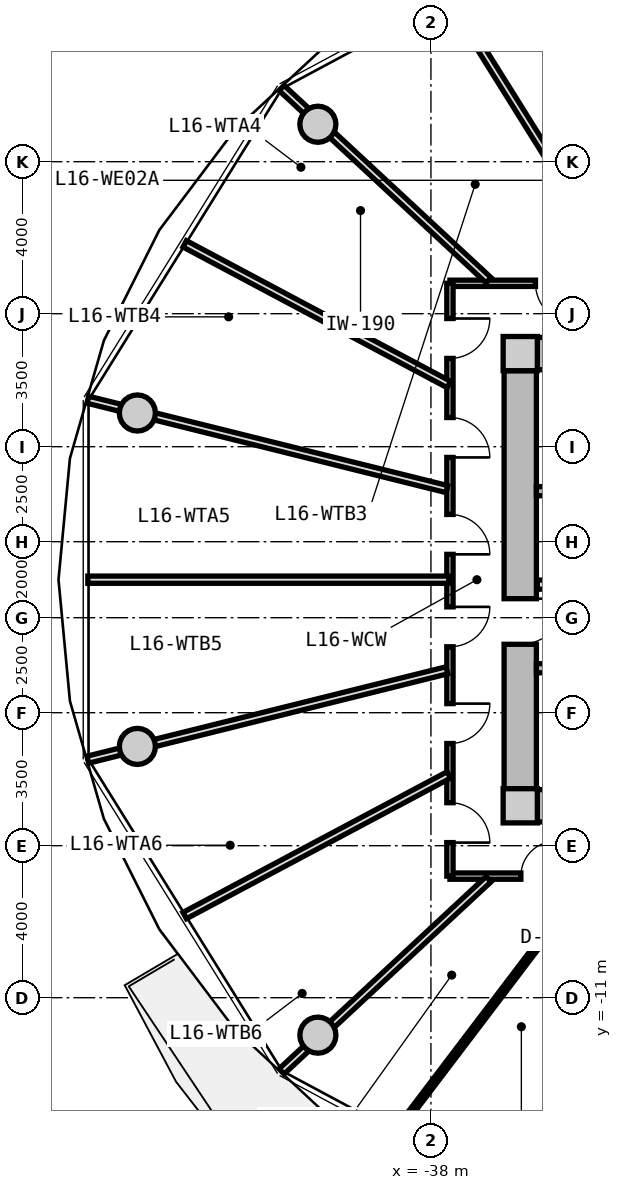
"""IFC4 building model, lengths in metres.
Left out: names, types, materials, properties, quantities, classifications, styles, units other than length and angle.
Written with IfcOpenShell. Run it as: python <this file> out.ifc"""

import sys

from ifc_helpers import new_model, si_unit, direction, frame, frame_2d, origin, origin_2d, place, context, subcontext, project, spatial, rectangle, circle, extrude, source, transform, mapped, element, fill, save


model = new_model("IFC4")
c1 = context("Model", 3, precision=1e-05, world=origin(), true_north=direction((0.0, 1.0)))
c2 = subcontext(c1, "Body", "Model", "MODEL_VIEW")
j1 = project(units=[si_unit("LENGTHUNIT", "METRE"), si_unit("PLANEANGLEUNIT", "RADIAN")], contexts=[c1])
p1 = place(None, origin())
s1 = spatial("IfcSite", under=j1, at=p1, CompositionType="ELEMENT")
p2 = place(p1, origin())
s2 = spatial("IfcBuilding", under=s1, at=p2, CompositionType="ELEMENT")
p3 = place(p2, frame((0.0, 0.0, 55.15)))
s3 = spatial("IfcBuildingStorey", under=s2, at=p3, CompositionType="ELEMENT", Elevation=55.15)
m1 = source(origin(), c2, "Body", "SweptSolid", [
    extrude(rectangle(XDim=0.9, YDim=0.9, at=origin_2d()), origin(), (0.0, 0.0, 1.0), 3.05),
])
for number, where, z_axis, x_axis in (
    (1, (-35.65, -5.95, 0.0), (0.0, 0.0, 1.0), (1.0, 0.0, 0.0)),
    (2, (-35.65, 5.95, 0.0), (0.0, 0.0, 1.0), (1.0, 0.0, 0.0)),
):
    element("IfcColumn", number, at=place(p3, frame(where, z_axis=z_axis, x_axis=x_axis)), inside=s3, PredefinedType="COLUMN", context=c2, shape_type="MappedRepresentation", body=[
        mapped(m1, transform((0.0, 0.0, 0.0), x_axis=(1.0, 0.0, 0.0), y_axis=(0.0, 1.0, 0.0), z_axis=(0.0, 0.0, 1.0), scale=1.0)),
    ])
m2 = source(origin(), c2, "Body", "SweptSolid", [
    extrude(rectangle(XDim=14.4, YDim=0.85, at=frame_2d((7.2, 0.0))), origin(), (0.0, 0.0, 1.0), 2.79),
])
for number, where, z_axis, x_axis in (
    (3, (-35.2, 5.95, 0.0), (0.0, 0.0, 1.0), (1.0, 0.0, 0.0)),
    (4, (-20.8, -5.95, 0.0), (0.0, 0.0, 1.0), (-1.0, 0.0, 0.0)),
):
    element("IfcWall", number, at=place(p3, frame(where, z_axis=z_axis, x_axis=x_axis)), inside=s3, PredefinedType="SHEAR", context=c2, shape_type="MappedRepresentation", body=[
        mapped(m2, transform((0.0, 0.0, 0.0), x_axis=(1.0, 0.0, 0.0), y_axis=(0.0, 1.0, 0.0), z_axis=(0.0, 0.0, 1.0), scale=1.0)),
    ])
m3 = source(origin(), c2, "Body", "SweptSolid", [
    extrude(rectangle(XDim=11.0, YDim=0.85, at=frame_2d((5.5, 0.0))), origin(), (0.0, 0.0, 1.0), 2.79),
])
p4 = place(p3, frame((-35.65, -5.5, 0.0), z_axis=(0.0, 0.0, 1.0), x_axis=(0.0, 1.0, 0.0)))
e5 = element("IfcWall", 5, at=p4, inside=s3, PredefinedType="SHEAR", context=c2, shape_type="MappedRepresentation", body=[
    mapped(m3, transform((0.0, 0.0, 0.0), x_axis=(1.0, 0.0, 0.0), y_axis=(0.0, 1.0, 0.0), z_axis=(0.0, 0.0, 1.0), scale=1.0)),
])
p5 = place(p4, frame((3.8, 0.0, 0.0)))
e6 = element("IfcOpeningElement", 6, at=p5, cuts=e5, PredefinedType="OPENING", context=c2, shape_type="SweptSolid", body=[
    extrude(rectangle(XDim=1.2, YDim=2.15, at=frame_2d((0.6, 1.075))), frame((0.0, 0.435, 0.0), z_axis=(0.0, -1.0, 0.0), x_axis=(1.0, 0.0, 0.0)), (0.0, 0.0, 1.0), 0.87),
])
m4 = source(origin(), c2, "Body", "SweptSolid", [
    extrude(circle(Radius=0.475, at=origin_2d()), origin(), (0.0, 0.0, 1.0), 3.05),
])
for number, where, z_axis, x_axis in (
    (7, (-40.975, 11.985, 0.0), (0.0, 0.0, 1.0), (1.0, 0.0, 0.0)),
    (8, (-45.725, 4.387, 0.0), (0.0, 0.0, 1.0), (1.0, 0.0, 0.0)),
    (9, (-45.725, -4.387, 0.0), (0.0, 0.0, 1.0), (1.0, 0.0, 0.0)),
    (10, (-40.975, -11.985, 0.0), (0.0, 0.0, 1.0), (1.0, 0.0, 0.0)),
):
    element("IfcColumn", number, at=place(p3, frame(where, z_axis=z_axis, x_axis=x_axis)), inside=s3, PredefinedType="COLUMN", context=c2, shape_type="MappedRepresentation", body=[
        mapped(m4, transform((0.0, 0.0, 0.0), x_axis=(1.0, 0.0, 0.0), y_axis=(0.0, 1.0, 0.0), z_axis=(0.0, 0.0, 1.0), scale=1.0)),
    ])
m5 = source(origin(), c2, "Body", "SweptSolid", [
    extrude(rectangle(XDim=7.765, YDim=0.24, at=frame_2d((3.883, 0.0))), origin(), (0.0, 0.0, 1.0), 2.79),
])
p6 = place(p3, frame((-35.225, 2.33, 0.0), z_axis=(0.0, 0.0, 1.0), x_axis=(1.0, 0.0, 0.0)))
e11 = element("IfcWall", 11, at=p6, inside=s3, PredefinedType="PARTITIONING", context=c2, shape_type="MappedRepresentation", body=[
    mapped(m5, transform((0.0, 0.0, 0.0), x_axis=(1.0, 0.0, 0.0), y_axis=(0.0, 1.0, 0.0), z_axis=(0.0, 0.0, 1.0), scale=1.0)),
])
p7 = place(p3, frame((-35.225, -2.33, 0.0), z_axis=(0.0, 0.0, 1.0), x_axis=(1.0, 0.0, 0.0)))
e12 = element("IfcWall", 12, at=p7, inside=s3, PredefinedType="PARTITIONING", context=c2, shape_type="MappedRepresentation", body=[
    mapped(m5, transform((0.0, 0.0, 0.0), x_axis=(1.0, 0.0, 0.0), y_axis=(0.0, 1.0, 0.0), z_axis=(0.0, 0.0, 1.0), scale=1.0)),
])
p8 = place(p7, frame((0.885, 0.0, 0.0)))
e13 = element("IfcOpeningElement", 13, at=p8, cuts=e12, PredefinedType="OPENING", context=c2, shape_type="SweptSolid", body=[
    extrude(rectangle(XDim=1.1, YDim=2.15, at=frame_2d((0.55, 1.075))), frame((0.0, 0.13, 0.0), z_axis=(0.0, -1.0, 0.0), x_axis=(1.0, 0.0, 0.0)), (0.0, 0.0, 1.0), 0.26),
])
m6 = source(origin(), c2, "Body", "SweptSolid", [
    extrude(rectangle(XDim=7.62, YDim=0.24, at=frame_2d((3.81, 0.0))), origin(), (0.0, 0.0, 1.0), 2.775),
])
p9 = place(p3, frame((-35.2, -0.13, 0.0), z_axis=(0.0, 0.0, 1.0), x_axis=(1.0, 0.0, 0.0)))
e14 = element("IfcWall", 14, at=p9, inside=s3, PredefinedType="PARTITIONING", context=c2, shape_type="MappedRepresentation", body=[
    mapped(m6, transform((0.0, 0.0, 0.0), x_axis=(1.0, 0.0, 0.0), y_axis=(0.0, 1.0, 0.0), z_axis=(0.0, 0.0, 1.0), scale=1.0)),
])
p10 = place(p9, frame((6.22, 0.0, 0.0)))
e15 = element("IfcOpeningElement", 15, at=p10, cuts=e14, PredefinedType="OPENING", context=c2, shape_type="SweptSolid", body=[
    extrude(rectangle(XDim=1.0, YDim=2.1, at=frame_2d((0.5, 1.05))), frame((0.0, 0.13, 0.0), z_axis=(0.0, -1.0, 0.0), x_axis=(1.0, 0.0, 0.0)), (0.0, 0.0, 1.0), 0.26),
])
p11 = place(p9, frame((0.85, 0.0, 0.0)))
e16 = element("IfcOpeningElement", 16, at=p11, cuts=e14, PredefinedType="OPENING", context=c2, shape_type="SweptSolid", body=[
    extrude(rectangle(XDim=1.1, YDim=2.2, at=frame_2d((0.55, 1.1))), frame((0.0, 0.13, 0.0), z_axis=(0.0, -1.0, 0.0), x_axis=(1.0, 0.0, 0.0)), (0.0, 0.0, 1.0), 0.26),
])
p12 = place(p9, frame((3.85, 0.0, 0.0)))
e17 = element("IfcOpeningElement", 17, at=p12, cuts=e14, PredefinedType="OPENING", context=c2, shape_type="SweptSolid", body=[
    extrude(rectangle(XDim=1.1, YDim=2.2, at=frame_2d((0.55, 1.1))), frame((0.0, 0.13, 0.0), z_axis=(0.0, -1.0, 0.0), x_axis=(1.0, 0.0, 0.0)), (0.0, 0.0, 1.0), 0.26),
])
m7 = source(origin(), c2, "Body", "SweptSolid", [
    extrude(rectangle(XDim=19.0, YDim=0.165, at=frame_2d((9.5, 0.0))), origin(), (0.0, 0.0, 1.0), 2.775),
])
p13 = place(p3, frame((-37.5, 7.8, 0.0), z_axis=(0.0, 0.0, 1.0), x_axis=(1.0, 0.0, 0.0)))
e18 = element("IfcWall", 18, at=p13, inside=s3, PredefinedType="PARTITIONING", context=c2, shape_type="MappedRepresentation", body=[
    mapped(m7, transform((0.0, 0.0, 0.0), x_axis=(1.0, 0.0, 0.0), y_axis=(0.0, 1.0, 0.0), z_axis=(0.0, 0.0, 1.0), scale=1.0)),
])
p14 = place(p13, frame((14.653, 0.0, 0.0)))
e19 = element("IfcOpeningElement", 19, at=p14, cuts=e18, PredefinedType="OPENING", context=c2, shape_type="SweptSolid", body=[
    extrude(rectangle(XDim=1.05, YDim=2.15, at=frame_2d((0.525, 1.075))), frame((0.0, 0.093, 0.0), z_axis=(0.0, -1.0, 0.0), x_axis=(1.0, 0.0, 0.0)), (0.0, 0.0, 1.0), 0.185),
])
p15 = place(p13, frame((12.5, 0.0, 0.0)))
e20 = element("IfcOpeningElement", 20, at=p15, cuts=e18, PredefinedType="OPENING", context=c2, shape_type="SweptSolid", body=[
    extrude(rectangle(XDim=1.05, YDim=2.15, at=frame_2d((0.525, 1.075))), frame((0.0, 0.093, 0.0), z_axis=(0.0, -1.0, 0.0), x_axis=(1.0, 0.0, 0.0)), (0.0, 0.0, 1.0), 0.185),
])
p16 = place(p13, frame((9.352, 0.0, 0.0)))
e21 = element("IfcOpeningElement", 21, at=p16, cuts=e18, PredefinedType="OPENING", context=c2, shape_type="SweptSolid", body=[
    extrude(rectangle(XDim=1.05, YDim=2.15, at=frame_2d((0.525, 1.075))), frame((0.0, 0.093, 0.0), z_axis=(0.0, -1.0, 0.0), x_axis=(1.0, 0.0, 0.0)), (0.0, 0.0, 1.0), 0.185),
])
p17 = place(p13, frame((7.806, 0.0, 0.0)))
e22 = element("IfcOpeningElement", 22, at=p17, cuts=e18, PredefinedType="OPENING", context=c2, shape_type="SweptSolid", body=[
    extrude(rectangle(XDim=1.05, YDim=2.15, at=frame_2d((0.525, 1.075))), frame((0.0, 0.093, 0.0), z_axis=(0.0, -1.0, 0.0), x_axis=(1.0, 0.0, 0.0)), (0.0, 0.0, 1.0), 0.185),
])
p18 = place(p13, frame((5.396, 0.0, 0.0)))
e23 = element("IfcOpeningElement", 23, at=p18, cuts=e18, PredefinedType="OPENING", context=c2, shape_type="SweptSolid", body=[
    extrude(rectangle(XDim=1.05, YDim=2.15, at=frame_2d((0.525, 1.075))), frame((0.0, 0.093, 0.0), z_axis=(0.0, -1.0, 0.0), x_axis=(1.0, 0.0, 0.0)), (0.0, 0.0, 1.0), 0.185),
])
p19 = place(p13, frame((2.251, 0.0, 0.0)))
e24 = element("IfcOpeningElement", 24, at=p19, cuts=e18, PredefinedType="OPENING", context=c2, shape_type="SweptSolid", body=[
    extrude(rectangle(XDim=1.05, YDim=2.15, at=frame_2d((0.525, 1.075))), frame((0.0, 0.093, 0.0), z_axis=(0.0, -1.0, 0.0), x_axis=(1.0, 0.0, 0.0)), (0.0, 0.0, 1.0), 0.185),
])
p20 = place(p3, frame((-18.5, -7.8, 0.0), z_axis=(0.0, 0.0, 1.0), x_axis=(-1.0, 0.0, 0.0)))
e25 = element("IfcWall", 25, at=p20, inside=s3, PredefinedType="PARTITIONING", context=c2, shape_type="MappedRepresentation", body=[
    mapped(m7, transform((0.0, 0.0, 0.0), x_axis=(1.0, 0.0, 0.0), y_axis=(0.0, 1.0, 0.0), z_axis=(0.0, 0.0, 1.0), scale=1.0)),
])
p21 = place(p20, frame((16.214, 0.0, 0.0)))
e26 = element("IfcOpeningElement", 26, at=p21, cuts=e25, PredefinedType="OPENING", context=c2, shape_type="SweptSolid", body=[
    extrude(rectangle(XDim=0.92, YDim=2.1, at=frame_2d((0.46, 1.05))), frame((0.0, 0.093, 0.0), z_axis=(0.0, -1.0, 0.0), x_axis=(1.0, 0.0, 0.0)), (0.0, 0.0, 1.0), 0.185),
])
p22 = place(p20, frame((13.063, 0.0, 0.0)))
e27 = element("IfcOpeningElement", 27, at=p22, cuts=e25, PredefinedType="OPENING", context=c2, shape_type="SweptSolid", body=[
    extrude(rectangle(XDim=0.92, YDim=2.1, at=frame_2d((0.46, 1.05))), frame((0.0, 0.093, 0.0), z_axis=(0.0, -1.0, 0.0), x_axis=(1.0, 0.0, 0.0)), (0.0, 0.0, 1.0), 0.185),
])
p23 = place(p20, frame((8.875, 0.0, 0.0)))
e28 = element("IfcOpeningElement", 28, at=p23, cuts=e25, PredefinedType="OPENING", context=c2, shape_type="SweptSolid", body=[
    extrude(rectangle(XDim=1.25, YDim=2.2, at=frame_2d((0.625, 1.1))), frame((0.0, 0.093, 0.0), z_axis=(0.0, -1.0, 0.0), x_axis=(1.0, 0.0, 0.0)), (0.0, 0.0, 1.0), 0.185),
])
p24 = place(p20, frame((3.506, 0.0, 0.0)))
e29 = element("IfcOpeningElement", 29, at=p24, cuts=e25, PredefinedType="OPENING", context=c2, shape_type="SweptSolid", body=[
    extrude(rectangle(XDim=1.25, YDim=2.2, at=frame_2d((0.625, 1.1))), frame((0.0, 0.093, 0.0), z_axis=(0.0, -1.0, 0.0), x_axis=(1.0, 0.0, 0.0)), (0.0, 0.0, 1.0), 0.185),
])
m8 = source(origin(), c2, "Body", "SweptSolid", [
    extrude(rectangle(XDim=15.6, YDim=0.165, at=frame_2d((7.8, 0.0))), origin(), (0.0, 0.0, 1.0), 2.775),
])
p25 = place(p3, frame((-37.5, -7.8, 0.0), z_axis=(0.0, 0.0, 1.0), x_axis=(0.0, 1.0, 0.0)))
e30 = element("IfcWall", 30, at=p25, inside=s3, PredefinedType="PARTITIONING", context=c2, shape_type="MappedRepresentation", body=[
    mapped(m8, transform((0.0, 0.0, 0.0), x_axis=(1.0, 0.0, 0.0), y_axis=(0.0, 1.0, 0.0), z_axis=(0.0, 0.0, 1.0), scale=1.0)),
])
p26 = place(p25, frame((13.623, 0.0, 0.0)))
e31 = element("IfcOpeningElement", 31, at=p26, cuts=e30, PredefinedType="OPENING", context=c2, shape_type="SweptSolid", body=[
    extrude(rectangle(XDim=1.05, YDim=2.15, at=frame_2d((0.525, 1.075))), frame((0.0, 0.093, 0.0), z_axis=(0.0, -1.0, 0.0), x_axis=(1.0, 0.0, 0.0)), (0.0, 0.0, 1.0), 0.185),
])
p27 = place(p25, frame((11.018, 0.0, 0.0)))
e32 = element("IfcOpeningElement", 32, at=p27, cuts=e30, PredefinedType="OPENING", context=c2, shape_type="SweptSolid", body=[
    extrude(rectangle(XDim=1.05, YDim=2.15, at=frame_2d((0.525, 1.075))), frame((0.0, 0.093, 0.0), z_axis=(0.0, -1.0, 0.0), x_axis=(1.0, 0.0, 0.0)), (0.0, 0.0, 1.0), 0.185),
])
p28 = place(p25, frame((8.467, 0.0, 0.0)))
e33 = element("IfcOpeningElement", 33, at=p28, cuts=e30, PredefinedType="OPENING", context=c2, shape_type="SweptSolid", body=[
    extrude(rectangle(XDim=1.05, YDim=2.15, at=frame_2d((0.525, 1.075))), frame((0.0, 0.093, 0.0), z_axis=(0.0, -1.0, 0.0), x_axis=(1.0, 0.0, 0.0)), (0.0, 0.0, 1.0), 0.185),
])
p29 = place(p25, frame((6.035, 0.0, 0.0)))
e34 = element("IfcOpeningElement", 34, at=p29, cuts=e30, PredefinedType="OPENING", context=c2, shape_type="SweptSolid", body=[
    extrude(rectangle(XDim=1.05, YDim=2.15, at=frame_2d((0.525, 1.075))), frame((0.0, 0.093, 0.0), z_axis=(0.0, -1.0, 0.0), x_axis=(1.0, 0.0, 0.0)), (0.0, 0.0, 1.0), 0.185),
])
p30 = place(p25, frame((3.489, 0.0, 0.0)))
e35 = element("IfcOpeningElement", 35, at=p30, cuts=e30, PredefinedType="OPENING", context=c2, shape_type="SweptSolid", body=[
    extrude(rectangle(XDim=1.05, YDim=2.15, at=frame_2d((0.525, 1.075))), frame((0.0, 0.093, 0.0), z_axis=(0.0, -1.0, 0.0), x_axis=(1.0, 0.0, 0.0)), (0.0, 0.0, 1.0), 0.185),
])
p31 = place(p25, frame((0.882, 0.0, 0.0)))
e36 = element("IfcOpeningElement", 36, at=p31, cuts=e30, PredefinedType="OPENING", context=c2, shape_type="SweptSolid", body=[
    extrude(rectangle(XDim=1.05, YDim=2.15, at=frame_2d((0.525, 1.075))), frame((0.0, 0.093, 0.0), z_axis=(0.0, -1.0, 0.0), x_axis=(1.0, 0.0, 0.0)), (0.0, 0.0, 1.0), 0.185),
])
m9 = source(origin(), c2, "Body", "SweptSolid", [
    extrude(rectangle(XDim=7.435, YDim=0.19, at=frame_2d((3.717, 0.0))), origin(), (0.0, 0.0, 1.0), 2.225),
])
p32 = place(p3, frame((-36.483, 7.88, 0.0), z_axis=(0.0, 0.0, 1.0), x_axis=(-0.732651956848, 0.680603489652, 0.0)))
e37 = element("IfcWall", 37, at=p32, inside=s3, PredefinedType="PARTITIONING", context=c2, shape_type="MappedRepresentation", body=[
    mapped(m9, transform((0.0, 0.0, 0.0), x_axis=(1.0, 0.0, 0.0), y_axis=(0.0, 1.0, 0.0), z_axis=(0.0, 0.0, 1.0), scale=1.0)),
])
m10 = source(origin(), c2, "Body", "SweptSolid", [
    extrude(rectangle(XDim=9.737, YDim=0.19, at=frame_2d((4.869, 0.0))), origin(), (0.0, 0.0, 1.0), 2.225),
])
p33 = place(p3, frame((-37.58, 2.385, 0.0), z_axis=(0.0, 0.0, 1.0), x_axis=(-0.970392716238, 0.241532557375, 0.0)))
e38 = element("IfcWall", 38, at=p33, inside=s3, PredefinedType="PARTITIONING", context=c2, shape_type="MappedRepresentation", body=[
    mapped(m10, transform((0.0, 0.0, 0.0), x_axis=(1.0, 0.0, 0.0), y_axis=(0.0, 1.0, 0.0), z_axis=(0.0, 0.0, 1.0), scale=1.0)),
])
m11 = source(origin(), c2, "Body", "SweptSolid", [
    extrude(rectangle(XDim=7.873, YDim=0.19, at=frame_2d((3.937, 0.0))), origin(), (0.0, 0.0, 1.0), 2.775),
])
p34 = place(p3, frame((-37.53, 5.138, 0.0), z_axis=(0.0, 0.0, 1.0), x_axis=(-0.882666052726, 0.470000680175, 0.0)))
e39 = element("IfcWall", 39, at=p34, inside=s3, PredefinedType="PARTITIONING", context=c2, shape_type="MappedRepresentation", body=[
    mapped(m11, transform((0.0, 0.0, 0.0), x_axis=(1.0, 0.0, 0.0), y_axis=(0.0, 1.0, 0.0), z_axis=(0.0, 0.0, 1.0), scale=1.0)),
])
p35 = place(p3, frame((-37.58, -2.385, 0.0), z_axis=(0.0, 0.0, 1.0), x_axis=(-0.970392716238, -0.241532557375, 0.0)))
e40 = element("IfcWall", 40, at=p35, inside=s3, PredefinedType="PARTITIONING", context=c2, shape_type="MappedRepresentation", body=[
    mapped(m10, transform((0.0, 0.0, 0.0), x_axis=(1.0, 0.0, 0.0), y_axis=(0.0, 1.0, 0.0), z_axis=(0.0, 0.0, 1.0), scale=1.0)),
])
m12 = source(origin(), c2, "Body", "SweptSolid", [
    extrude(rectangle(XDim=9.499, YDim=0.19, at=frame_2d((4.75, 0.0))), origin(), (0.0, 0.0, 1.0), 2.775),
])
p36 = place(p3, frame((-37.53, 0.0, 0.0), z_axis=(0.0, 0.0, 1.0), x_axis=(-1.0, 0.0, 0.0)))
e41 = element("IfcWall", 41, at=p36, inside=s3, PredefinedType="PARTITIONING", context=c2, shape_type="MappedRepresentation", body=[
    mapped(m12, transform((0.0, 0.0, 0.0), x_axis=(1.0, 0.0, 0.0), y_axis=(0.0, 1.0, 0.0), z_axis=(0.0, 0.0, 1.0), scale=1.0)),
])
p37 = place(p3, frame((-36.483, -7.88, 0.0), z_axis=(0.0, 0.0, 1.0), x_axis=(-0.732651956848, -0.680603489652, 0.0)))
e42 = element("IfcWall", 42, at=p37, inside=s3, PredefinedType="PARTITIONING", context=c2, shape_type="MappedRepresentation", body=[
    mapped(m9, transform((0.0, 0.0, 0.0), x_axis=(1.0, 0.0, 0.0), y_axis=(0.0, 1.0, 0.0), z_axis=(0.0, 0.0, 1.0), scale=1.0)),
])
p38 = place(p3, frame((-37.53, -5.138, 0.0), z_axis=(0.0, 0.0, 1.0), x_axis=(-0.882666052726, -0.470000680175, 0.0)))
e43 = element("IfcWall", 43, at=p38, inside=s3, PredefinedType="PARTITIONING", context=c2, shape_type="MappedRepresentation", body=[
    mapped(m11, transform((0.0, 0.0, 0.0), x_axis=(1.0, 0.0, 0.0), y_axis=(0.0, 1.0, 0.0), z_axis=(0.0, 0.0, 1.0), scale=1.0)),
])
m13 = source(origin(), c2, "Body", "SweptSolid", [
    extrude(rectangle(XDim=8.436, YDim=0.14, at=frame_2d((4.218, 0.0))), origin(), (0.0, 0.0, 1.0), 2.775),
])
p39 = place(p3, frame((-33.828, -7.83, 0.0), z_axis=(0.0, 0.0, 1.0), x_axis=(-0.604486552388, -0.796615345058, 0.0)))
e44 = element("IfcWall", 44, at=p39, inside=s3, PredefinedType="PARTITIONING", context=c2, shape_type="MappedRepresentation", body=[
    mapped(m13, transform((0.0, 0.0, 0.0), x_axis=(1.0, 0.0, 0.0), y_axis=(0.0, 1.0, 0.0), z_axis=(0.0, 0.0, 1.0), scale=1.0)),
])
m14 = source(origin(), c2, "Body", "SweptSolid", [
    extrude(rectangle(XDim=8.818, YDim=0.19, at=frame_2d((4.409, 0.0))), origin(), (0.0, 0.0, 1.0), 2.775),
])
p40 = place(p3, frame((-32.841, 7.83, 0.0), z_axis=(0.0, 0.0, 1.0), x_axis=(-0.529931746109, 0.848040296487, 0.0)))
e45 = element("IfcWall", 45, at=p40, inside=s3, PredefinedType="PARTITIONING", context=c2, shape_type="MappedRepresentation", body=[
    mapped(m14, transform((0.0, 0.0, 0.0), x_axis=(1.0, 0.0, 0.0), y_axis=(0.0, 1.0, 0.0), z_axis=(0.0, 0.0, 1.0), scale=1.0)),
])
m15 = source(origin(), c2, "Body", "SweptSolid", [
    extrude(rectangle(XDim=1.2, YDim=2.15, at=frame_2d((0.6, 1.075))), frame((0.0, 0.025, 0.0), z_axis=(0.0, -1.0, 0.0), x_axis=(1.0, 0.0, 0.0)), (0.0, 0.0, 1.0), 0.05),
])
p41 = place(p5, frame((1.2, 0.0, 0.0), z_axis=(0.0, 0.0, 1.0), x_axis=(-1.0, 0.0, 0.0)))
e46 = element("IfcDoor", 46, at=p41, inside=s3, OperationType="SINGLE_SWING_LEFT", PredefinedType="DOOR", context=c2, shape_type="MappedRepresentation", body=[
    mapped(m15, transform((0.0, 0.0, 0.0), x_axis=(1.0, 0.0, 0.0), y_axis=(0.0, 1.0, 0.0), z_axis=(0.0, 0.0, 1.0), scale=1.0)),
])
fill(e6, e46)
m16 = source(origin(), c2, "Body", "SweptSolid", [
    extrude(rectangle(XDim=1.05, YDim=2.15, at=frame_2d((0.525, 1.075))), frame((0.0, 0.025, 0.0), z_axis=(0.0, -1.0, 0.0), x_axis=(1.0, 0.0, 0.0)), (0.0, 0.0, 1.0), 0.05),
])
p42 = place(p26, frame((1.05, 0.0, 0.0), z_axis=(0.0, 0.0, 1.0), x_axis=(-1.0, 0.0, 0.0)))
e47 = element("IfcDoor", 47, at=p42, inside=s3, OperationType="SINGLE_SWING_LEFT", PredefinedType="DOOR", context=c2, shape_type="MappedRepresentation", body=[
    mapped(m16, transform((0.0, 0.0, 0.0), x_axis=(1.0, 0.0, 0.0), y_axis=(0.0, 1.0, 0.0), z_axis=(0.0, 0.0, 1.0), scale=1.0)),
])
fill(e31, e47)
p43 = place(p27, frame((1.05, 0.0, 0.0), z_axis=(0.0, 0.0, 1.0), x_axis=(-1.0, 0.0, 0.0)))
e48 = element("IfcDoor", 48, at=p43, inside=s3, OperationType="SINGLE_SWING_RIGHT", PredefinedType="DOOR", context=c2, shape_type="MappedRepresentation", body=[
    mapped(m16, transform((0.0, 0.0, 0.0), x_axis=(1.0, 0.0, 0.0), y_axis=(0.0, 1.0, 0.0), z_axis=(0.0, 0.0, 1.0), scale=1.0)),
])
fill(e32, e48)
p44 = place(p28, frame((1.05, 0.0, 0.0), z_axis=(0.0, 0.0, 1.0), x_axis=(-1.0, 0.0, 0.0)))
e49 = element("IfcDoor", 49, at=p44, inside=s3, OperationType="SINGLE_SWING_RIGHT", PredefinedType="DOOR", context=c2, shape_type="MappedRepresentation", body=[
    mapped(m16, transform((0.0, 0.0, 0.0), x_axis=(1.0, 0.0, 0.0), y_axis=(0.0, 1.0, 0.0), z_axis=(0.0, 0.0, 1.0), scale=1.0)),
])
fill(e33, e49)
p45 = place(p29, frame((1.05, 0.0, 0.0), z_axis=(0.0, 0.0, 1.0), x_axis=(-1.0, 0.0, 0.0)))
e50 = element("IfcDoor", 50, at=p45, inside=s3, OperationType="SINGLE_SWING_LEFT", PredefinedType="DOOR", context=c2, shape_type="MappedRepresentation", body=[
    mapped(m16, transform((0.0, 0.0, 0.0), x_axis=(1.0, 0.0, 0.0), y_axis=(0.0, 1.0, 0.0), z_axis=(0.0, 0.0, 1.0), scale=1.0)),
])
fill(e34, e50)
p46 = place(p30, frame((1.05, 0.0, 0.0), z_axis=(0.0, 0.0, 1.0), x_axis=(-1.0, 0.0, 0.0)))
e51 = element("IfcDoor", 51, at=p46, inside=s3, OperationType="SINGLE_SWING_LEFT", PredefinedType="DOOR", context=c2, shape_type="MappedRepresentation", body=[
    mapped(m16, transform((0.0, 0.0, 0.0), x_axis=(1.0, 0.0, 0.0), y_axis=(0.0, 1.0, 0.0), z_axis=(0.0, 0.0, 1.0), scale=1.0)),
])
fill(e35, e51)
p47 = place(p31, frame((1.05, 0.0, 0.0), z_axis=(0.0, 0.0, 1.0), x_axis=(-1.0, 0.0, 0.0)))
e52 = element("IfcDoor", 52, at=p47, inside=s3, OperationType="SINGLE_SWING_RIGHT", PredefinedType="DOOR", context=c2, shape_type="MappedRepresentation", body=[
    mapped(m16, transform((0.0, 0.0, 0.0), x_axis=(1.0, 0.0, 0.0), y_axis=(0.0, 1.0, 0.0), z_axis=(0.0, 0.0, 1.0), scale=1.0)),
])
fill(e36, e52)
m17 = source(origin(), c2, "Body", "SweptSolid", [
    extrude(rectangle(XDim=0.92, YDim=2.1, at=frame_2d((0.46, 1.05))), frame((0.0, 0.025, 0.0), z_axis=(0.0, -1.0, 0.0), x_axis=(1.0, 0.0, 0.0)), (0.0, 0.0, 1.0), 0.05),
])
p48 = place(p21, frame((0.92, 0.0, 0.0), z_axis=(0.0, 0.0, 1.0), x_axis=(-1.0, 0.0, 0.0)))
e53 = element("IfcDoor", 53, at=p48, inside=s3, OperationType="SINGLE_SWING_RIGHT", PredefinedType="DOOR", context=c2, shape_type="MappedRepresentation", body=[
    mapped(m17, transform((0.0, 0.0, 0.0), x_axis=(1.0, 0.0, 0.0), y_axis=(0.0, 1.0, 0.0), z_axis=(0.0, 0.0, 1.0), scale=1.0)),
])
fill(e26, e53)
p49 = place(p19, frame((1.05, 0.0, 0.0), z_axis=(0.0, 0.0, 1.0), x_axis=(-1.0, 0.0, 0.0)))
e54 = element("IfcDoor", 54, at=p49, inside=s3, OperationType="SINGLE_SWING_LEFT", PredefinedType="DOOR", context=c2, shape_type="MappedRepresentation", body=[
    mapped(m16, transform((0.0, 0.0, 0.0), x_axis=(1.0, 0.0, 0.0), y_axis=(0.0, 1.0, 0.0), z_axis=(0.0, 0.0, 1.0), scale=1.0)),
])
fill(e24, e54)
save(model, sys.argv[1])
